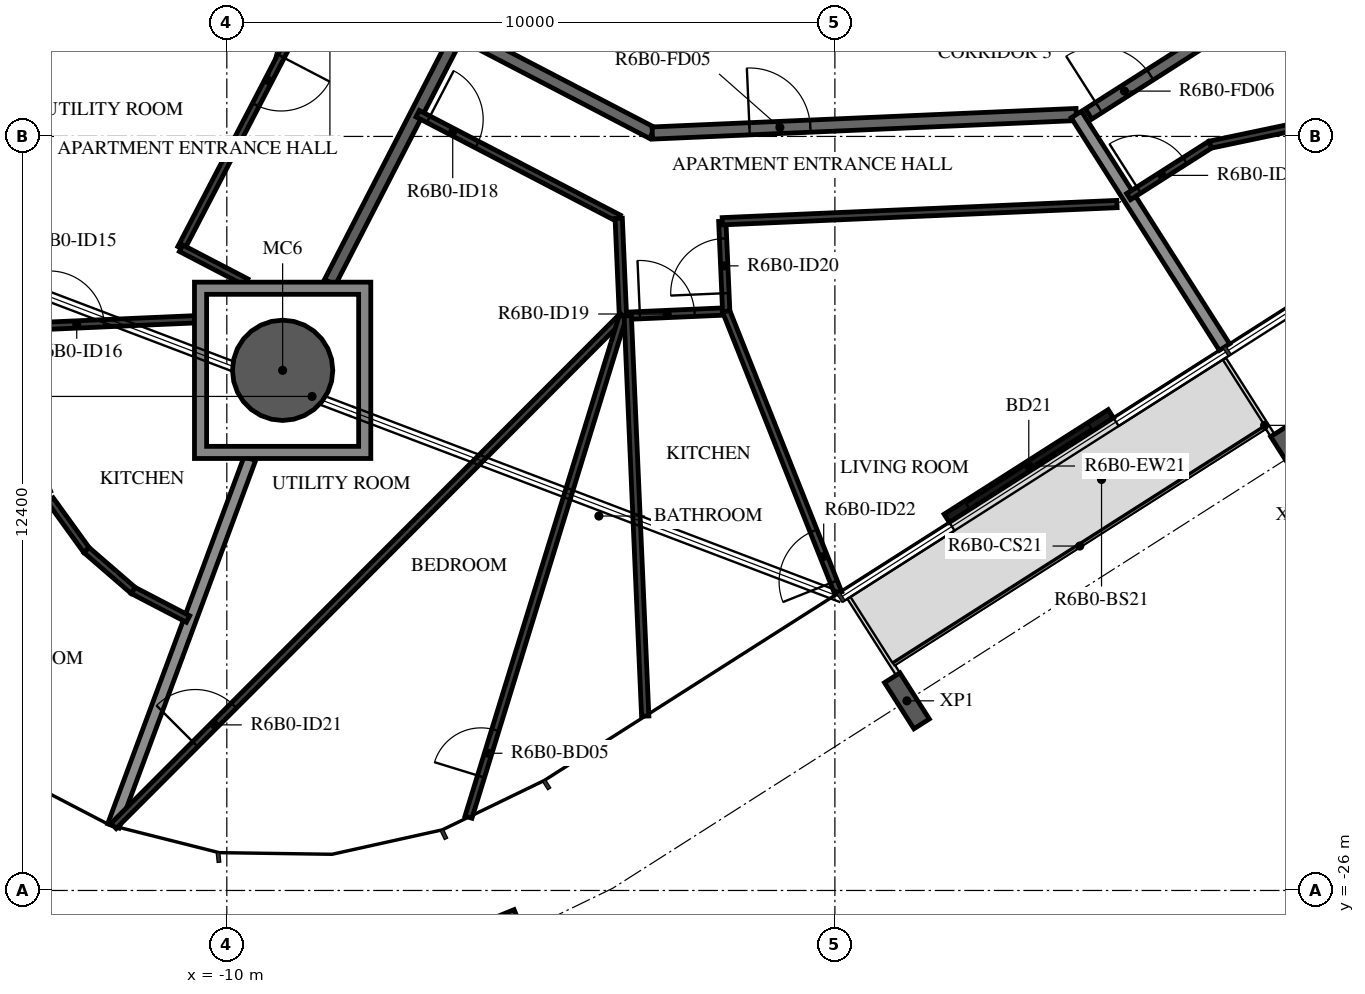
"""IFC4 building model, lengths in metres.
Left out: names, types, materials, properties, quantities, classifications, styles, units other than length and angle.
Written with IfcOpenShell. Run it as: python <this file> out.ifc"""

import sys

from ifc_helpers import new_model, si_unit, direction, frame, frame_2d, origin, origin_2d, place, context, subcontext, project, spatial, polyline, rectangle, hollow_circle, i_section, outline, extrude, element, fill, save


model = new_model("IFC4")
c1 = context("Model", 3, precision=1e-05, world=origin(), true_north=direction((0.0, 1.0)))
c2 = subcontext(c1, "Body", "Model", "MODEL_VIEW")
j1 = project(units=[si_unit("LENGTHUNIT", "METRE"), si_unit("PLANEANGLEUNIT", "RADIAN")], contexts=[c1])
p1 = place(None, origin())
s1 = spatial("IfcSite", under=j1, at=p1, CompositionType="ELEMENT")
p2 = place(p1, origin())
s2 = spatial("IfcBuilding", under=s1, at=p2, CompositionType="ELEMENT")
p3 = place(p2, frame((0.0, 0.0, 240.7)))
s3 = spatial("IfcBuildingStorey", under=s2, at=p3, CompositionType="ELEMENT", Elevation=240.7)
p4 = place(p3, frame((-9.082, -17.446, -0.38), z_axis=(0.0, 0.0, 1.0), x_axis=(1.0, 0.0, 0.0)))
e1 = element("IfcColumn", 1, at=p4, inside=s3, PredefinedType="COLUMN", context=c2, shape_type="SweptSolid", body=[
    extrude(hollow_circle(Radius=0.825, WallThickness=0.04, at=origin_2d()), origin(), (0.0, 0.0, 1.0), 3.5),
])
for number, where, z_axis, x_axis in (
    (2, (-5.243, -26.789, -0.38), (0.0, 0.0, 1.0), (-0.925, -0.38, 0.0)),
    (3, (1.185, -22.881, -0.38), (0.0, 0.0, 1.0), (-0.843, -0.537, 0.0)),
    (4, (7.535, -18.835, -0.38), (0.0, 0.0, 1.0), (-0.843, -0.537, 0.0)),
):
    element("IfcColumn", number, at=place(p3, frame(where, z_axis=z_axis, x_axis=x_axis)), inside=s3, PredefinedType="COLUMN", context=c2, shape_type="SweptSolid", body=[
        extrude(i_section(OverallWidth=0.3, OverallDepth=0.9, WebThickness=0.019, FlangeThickness=0.035, FilletRadius=0.03, at=origin_2d()), origin(), (0.0, 0.0, 1.0), 3.5),
    ])
p5 = place(p3, frame((1.839, -19.879, 0.0), z_axis=(0.0, 0.0, 1.0), x_axis=(0.843419508298, 0.53725555653, 0.0)))
e5 = element("IfcWall", 5, at=p5, inside=s3, PredefinedType="STANDARD", context=c2, shape_type="SweptSolid", body=[
    extrude(rectangle(XDim=3.2, YDim=0.16, at=frame_2d((1.6, 0.0))), origin(), (0.0, 0.0, 1.0), 3.12),
])
p6 = place(p5, frame((0.4, 0.0, 0.0)))
e6 = element("IfcOpeningElement", 6, at=p6, cuts=e5, PredefinedType="OPENING", context=c2, shape_type="SweptSolid", body=[
    extrude(rectangle(XDim=2.4, YDim=2.4, at=frame_2d((1.2, 1.2))), frame((0.0, 0.09, 0.0), z_axis=(0.0, -1.0, 0.0), x_axis=(1.0, 0.0, 0.0)), (0.0, 0.0, 1.0), 0.18),
])
p7 = place(p3, frame((-9.372, -10.228, 0.0), z_axis=(0.0, 0.0, 1.0), x_axis=(0.887005184532, -0.461759464021, 0.0)))
e7 = element("IfcWall", 7, at=p7, inside=s3, PredefinedType="STANDARD", context=c2, shape_type="SweptSolid", body=[
    extrude(rectangle(XDim=7.181, YDim=0.2, at=frame_2d((3.591, 0.0))), origin(), (0.0, 0.0, 1.0), 3.12),
])
p8 = place(p7, frame((2.391, 0.0, 0.0)))
e8 = element("IfcOpeningElement", 8, at=p8, cuts=e7, PredefinedType="OPENING", context=c2, shape_type="SweptSolid", body=[
    extrude(rectangle(XDim=1.0, YDim=2.1, at=frame_2d((0.5, 1.05))), frame((0.0, 0.11, 0.0), z_axis=(0.0, -1.0, 0.0), x_axis=(1.0, 0.0, 0.0)), (0.0, 0.0, 1.0), 0.22),
])
p9 = place(p3, frame((-3.003, -13.544, 0.0), z_axis=(0.0, 0.0, 1.0), x_axis=(0.999048221872, 0.043619380718, 0.0)))
e9 = element("IfcWall", 9, at=p9, inside=s3, PredefinedType="STANDARD", context=c2, shape_type="SweptSolid", body=[
    extrude(rectangle(XDim=6.979, YDim=0.2, at=frame_2d((3.49, 0.0))), origin(), (0.0, 0.0, 1.0), 3.12),
])
p10 = place(p9, frame((1.6, 0.0, 0.0)))
e10 = element("IfcOpeningElement", 10, at=p10, cuts=e9, PredefinedType="OPENING", context=c2, shape_type="SweptSolid", body=[
    extrude(rectangle(XDim=1.0, YDim=2.1, at=frame_2d((0.5, 1.05))), frame((0.0, 0.11, 0.0), z_axis=(0.0, -1.0, 0.0), x_axis=(1.0, 0.0, 0.0)), (0.0, 0.0, 1.0), 0.22),
])
p11 = place(p3, frame((4.172, -13.231, 0.0), z_axis=(0.0, 0.0, 1.0), x_axis=(0.843388394728, 0.537304397561, 0.0)))
e11 = element("IfcWall", 11, at=p11, inside=s3, PredefinedType="STANDARD", context=c2, shape_type="SweptSolid", body=[
    extrude(rectangle(XDim=7.181, YDim=0.2, at=frame_2d((3.59, 0.0))), origin(), (0.0, 0.0, 1.0), 3.12),
])
p12 = place(p11, frame((0.2, 0.0, 0.0)))
e12 = element("IfcOpeningElement", 12, at=p12, cuts=e11, PredefinedType="OPENING", context=c2, shape_type="SweptSolid", body=[
    extrude(rectangle(XDim=1.0, YDim=2.1, at=frame_2d((0.5, 1.05))), frame((0.0, 0.11, 0.0), z_axis=(0.0, -1.0, 0.0), x_axis=(1.0, 0.0, 0.0)), (0.0, 0.0, 1.0), 0.22),
])
p13 = place(p3, frame((-8.303, -15.996, 0.0), z_axis=(0.0, 0.0, 1.0), x_axis=(0.457702371186, 0.889105471477, 0.0)))
e13 = element("IfcWall", 13, at=p13, inside=s3, PredefinedType="STANDARD", context=c2, shape_type="SweptSolid", body=[
    extrude(rectangle(XDim=4.623, YDim=0.2, at=frame_2d((2.312, 0.0))), origin(), (0.0, 0.0, 1.0), 3.12),
])
p14 = place(p3, frame((-11.865, -24.939, 0.0), z_axis=(0.0, 0.0, 1.0), x_axis=(0.348245485283, 0.937403372076, 0.0)))
e14 = element("IfcWall", 14, at=p14, inside=s3, PredefinedType="STANDARD", context=c2, shape_type="SweptSolid", body=[
    extrude(rectangle(XDim=6.446, YDim=0.2, at=frame_2d((3.223, 0.0))), origin(), (0.0, 0.0, 1.0), 2.73),
])
p15 = place(p3, frame((6.407, -17.064, 0.0), z_axis=(0.0, 0.0, 1.0), x_axis=(-0.537324777979, 0.843375410461, 0.0)))
e15 = element("IfcWall", 15, at=p15, inside=s3, PredefinedType="STANDARD", context=c2, shape_type="SweptSolid", body=[
    extrude(rectangle(XDim=4.535, YDim=0.2, at=frame_2d((2.268, 0.0))), origin(), (0.0, 0.0, 1.0), 2.73),
])
p16 = place(p3, frame((-9.016, -12.104, 0.0), z_axis=(0.0, 0.0, 1.0), x_axis=(-0.4617534789, -0.887008300256, 0.0)))
e16 = element("IfcWall", 16, at=p16, inside=s3, PredefinedType="PARTITIONING", context=c2, shape_type="SweptSolid", body=[
    extrude(rectangle(XDim=3.759, YDim=0.12, at=frame_2d((1.88, 0.0))), origin(), (0.0, 0.0, 1.0), 3.12),
])
p17 = place(p16, frame((0.2, 0.0, 0.0)))
e17 = element("IfcOpeningElement", 17, at=p17, cuts=e16, PredefinedType="OPENING", context=c2, shape_type="SweptSolid", body=[
    extrude(rectangle(XDim=0.9, YDim=2.1, at=frame_2d((0.45, 1.05))), frame((0.0, 0.07, 0.0), z_axis=(0.0, -1.0, 0.0), x_axis=(1.0, 0.0, 0.0)), (0.0, 0.0, 1.0), 0.14),
])
p18 = place(p3, frame((-10.752, -15.439, 0.0), z_axis=(0.0, 0.0, 1.0), x_axis=(0.887031383626, -0.461709134048, 0.0)))
e18 = element("IfcWall", 18, at=p18, inside=s3, PredefinedType="PARTITIONING", context=c2, shape_type="SweptSolid", body=[
    extrude(rectangle(XDim=1.208, YDim=0.12, at=frame_2d((0.604, 0.0))), origin(), (0.0, 0.0, 1.0), 3.12),
])
p19 = place(p3, frame((-13.517, -16.738, 0.0), z_axis=(0.0, 0.0, 1.0), x_axis=(0.999047660155, 0.043632244256, 0.0)))
e19 = element("IfcWall", 19, at=p19, inside=s3, PredefinedType="PARTITIONING", context=c2, shape_type="SweptSolid", body=[
    extrude(rectangle(XDim=2.988, YDim=0.12, at=frame_2d((1.494, 0.0))), origin(), (0.0, 0.0, 1.0), 3.12),
])
p20 = place(p19, frame((0.6, 0.0, 0.0)))
e20 = element("IfcOpeningElement", 20, at=p20, cuts=e19, PredefinedType="OPENING", context=c2, shape_type="SweptSolid", body=[
    extrude(rectangle(XDim=0.9, YDim=2.1, at=frame_2d((0.45, 1.05))), frame((0.0, 0.07, 0.0), z_axis=(0.0, -1.0, 0.0), x_axis=(1.0, 0.0, 0.0)), (0.0, 0.0, 1.0), 0.14),
])
for number, where, z_axis, x_axis in (
    (21, (-12.903, -19.579, 0.0), (0.0, 0.0, 1.0), (0.585, -0.811, 0.0)),
    (22, (-12.308, -20.402, 0.0), (0.0, 0.0, 1.0), (0.757, -0.654, 0.0)),
    (23, (-11.539, -21.067, 0.0), (0.0, 0.0, 1.0), (0.887, -0.462, 0.0)),
):
    element("IfcWall", number, at=place(p3, frame(where, z_axis=z_axis, x_axis=x_axis)), inside=s3, PredefinedType="PARTITIONING", context=c2, shape_type="SweptSolid", body=[
        extrude(rectangle(XDim=1.016, YDim=0.12, at=frame_2d((0.508, 0.0))), origin(), (0.0, 0.0, 1.0), 3.12),
    ])
p21 = place(p3, frame((-6.861, -13.226, 0.0), z_axis=(0.0, 0.0, 1.0), x_axis=(0.887010791097, -0.461748694073, 0.0)))
e24 = element("IfcWall", 24, at=p21, inside=s3, PredefinedType="PARTITIONING", context=c2, shape_type="SweptSolid", body=[
    extrude(rectangle(XDim=3.727, YDim=0.12, at=frame_2d((1.864, 0.0))), origin(), (0.0, 0.0, 1.0), 3.12),
])
p22 = place(p21, frame((0.2, 0.0, 0.0)))
e25 = element("IfcOpeningElement", 25, at=p22, cuts=e24, PredefinedType="OPENING", context=c2, shape_type="SweptSolid", body=[
    extrude(rectangle(XDim=0.9, YDim=2.1, at=frame_2d((0.45, 1.05))), frame((0.0, 0.07, 0.0), z_axis=(0.0, -1.0, 0.0), x_axis=(1.0, 0.0, 0.0)), (0.0, 0.0, 1.0), 0.14),
])
p23 = place(p3, frame((-3.555, -14.947, 0.0), z_axis=(0.0, 0.0, 1.0), x_axis=(0.043470204022, -0.999054723908, 0.0)))
e26 = element("IfcWall", 26, at=p23, inside=s3, PredefinedType="PARTITIONING", context=c2, shape_type="SweptSolid", body=[
    extrude(rectangle(XDim=1.606, YDim=0.12, at=frame_2d((0.803, 0.0))), origin(), (0.0, 0.0, 1.0), 3.12),
])
p24 = place(p3, frame((-3.407, -16.548, 0.0), z_axis=(0.0, 0.0, 1.0), x_axis=(0.999045901572, 0.043672491929, 0.0)))
e27 = element("IfcWall", 27, at=p24, inside=s3, PredefinedType="PARTITIONING", context=c2, shape_type="SweptSolid", body=[
    extrude(rectangle(XDim=1.621, YDim=0.12, at=frame_2d((0.811, 0.0))), origin(), (0.0, 0.0, 1.0), 3.12),
])
p25 = place(p24, frame((0.2, 0.0, 0.0)))
e28 = element("IfcOpeningElement", 28, at=p25, cuts=e27, PredefinedType="OPENING", context=c2, shape_type="SweptSolid", body=[
    extrude(rectangle(XDim=0.9, YDim=2.1, at=frame_2d((0.45, 1.05))), frame((0.0, 0.07, 0.0), z_axis=(0.0, -1.0, 0.0), x_axis=(1.0, 0.0, 0.0)), (0.0, 0.0, 1.0), 0.14),
])
p26 = place(p3, frame((-1.787, -16.478, 0.0), z_axis=(0.0, 0.0, 1.0), x_axis=(-0.043601447011, 0.999049004713, 0.0)))
e29 = element("IfcWall", 29, at=p26, inside=s3, PredefinedType="PARTITIONING", context=c2, shape_type="SweptSolid", body=[
    extrude(rectangle(XDim=1.484, YDim=0.12, at=frame_2d((0.742, 0.0))), origin(), (0.0, 0.0, 1.0), 3.12),
])
p27 = place(p26, frame((0.3, 0.0, 0.0)))
e30 = element("IfcOpeningElement", 30, at=p27, cuts=e29, PredefinedType="OPENING", context=c2, shape_type="SweptSolid", body=[
    extrude(rectangle(XDim=0.9, YDim=2.1, at=frame_2d((0.45, 1.05))), frame((0.0, 0.07, 0.0), z_axis=(0.0, -1.0, 0.0), x_axis=(1.0, 0.0, 0.0)), (0.0, 0.0, 1.0), 0.14),
])
p28 = place(p3, frame((-1.852, -14.995, 0.0), z_axis=(0.0, 0.0, 1.0), x_axis=(0.999047773092, 0.043629658249, 0.0)))
e31 = element("IfcWall", 31, at=p28, inside=s3, PredefinedType="PARTITIONING", context=c2, shape_type="SweptSolid", body=[
    extrude(rectangle(XDim=6.497, YDim=0.12, at=frame_2d((3.248, 0.0))), origin(), (0.0, 0.0, 1.0), 3.12),
])
p29 = place(p3, frame((-11.862, -24.94, 0.0), z_axis=(0.0, 0.0, 1.0), x_axis=(0.70663293894, 0.707580306117, 0.0)))
e32 = element("IfcWall", 32, at=p29, inside=s3, PredefinedType="PARTITIONING", context=c2, shape_type="SweptSolid", body=[
    extrude(rectangle(XDim=11.854, YDim=0.12, at=frame_2d((5.927, 0.0))), origin(), (0.0, 0.0, 1.0), 3.12),
])
p30 = place(p29, frame((1.9, 0.0, 0.0)))
e33 = element("IfcOpeningElement", 33, at=p30, cuts=e32, PredefinedType="OPENING", context=c2, shape_type="SweptSolid", body=[
    extrude(rectangle(XDim=0.9, YDim=2.1, at=frame_2d((0.45, 1.05))), frame((0.0, 0.07, 0.0), z_axis=(0.0, -1.0, 0.0), x_axis=(1.0, 0.0, 0.0)), (0.0, 0.0, 1.0), 0.14),
])
p31 = place(p3, frame((-6.026, -24.795, 0.0), z_axis=(0.0, 0.0, 1.0), x_axis=(0.294501505058, 0.955651015548, 0.0)))
e34 = element("IfcWall", 34, at=p31, inside=s3, PredefinedType="PARTITIONING", context=c2, shape_type="SweptSolid", body=[
    extrude(rectangle(XDim=8.626, YDim=0.12, at=frame_2d((4.313, 0.0))), origin(), (0.0, 0.0, 1.0), 3.12),
])
p32 = place(p31, frame((0.7, 0.0, 0.0)))
e35 = element("IfcOpeningElement", 35, at=p32, cuts=e34, PredefinedType="OPENING", context=c2, shape_type="SweptSolid", body=[
    extrude(rectangle(XDim=0.8, YDim=2.1, at=frame_2d((0.4, 1.05))), frame((0.0, 0.07, 0.0), z_axis=(0.0, -1.0, 0.0), x_axis=(1.0, 0.0, 0.0)), (0.0, 0.0, 1.0), 0.14),
])
p33 = place(p3, frame((-3.119, -23.133, 0.0), z_axis=(0.0, 0.0, 1.0), x_axis=(-0.043633326708, 0.99904761288, 0.0)))
e36 = element("IfcWall", 36, at=p33, inside=s3, PredefinedType="PARTITIONING", context=c2, shape_type="SweptSolid", body=[
    extrude(rectangle(XDim=6.591, YDim=0.12, at=frame_2d((3.296, 0.0))), origin(), (0.0, 0.0, 1.0), 3.12),
])
p34 = place(p3, frame((0.056, -21.11, 0.0), z_axis=(0.0, 0.0, 1.0), x_axis=(-0.369701541807, 0.929150563679, 0.0)))
e37 = element("IfcWall", 37, at=p34, inside=s3, PredefinedType="PARTITIONING", context=c2, shape_type="SweptSolid", body=[
    extrude(rectangle(XDim=4.986, YDim=0.12, at=frame_2d((2.493, 0.0))), origin(), (0.0, 0.0, 1.0), 2.73),
])
p35 = place(p34, frame((0.2, 0.0, 0.0)))
e38 = element("IfcOpeningElement", 38, at=p35, cuts=e37, PredefinedType="OPENING", context=c2, shape_type="SweptSolid", body=[
    extrude(rectangle(XDim=0.9, YDim=2.1, at=frame_2d((0.45, 1.05))), frame((0.0, 0.07, 0.0), z_axis=(0.0, -1.0, 0.0), x_axis=(1.0, 0.0, 0.0)), (0.0, 0.0, 1.0), 0.14),
])
p36 = place(p3, frame((4.83, -14.59, 0.0), z_axis=(0.0, 0.0, 1.0), x_axis=(0.843395898817, 0.537292618467, 0.0)))
e39 = element("IfcWall", 39, at=p36, inside=s3, PredefinedType="PARTITIONING", context=c2, shape_type="SweptSolid", body=[
    extrude(rectangle(XDim=1.59, YDim=0.12, at=frame_2d((0.795, 0.0))), origin(), (0.0, 0.0, 1.0), 3.12),
])
p37 = place(p36, frame((0.2, 0.0, 0.0)))
e40 = element("IfcOpeningElement", 40, at=p37, cuts=e39, PredefinedType="OPENING", context=c2, shape_type="SweptSolid", body=[
    extrude(rectangle(XDim=0.9, YDim=2.1, at=frame_2d((0.45, 1.05))), frame((0.0, 0.07, 0.0), z_axis=(0.0, -1.0, 0.0), x_axis=(1.0, 0.0, 0.0)), (0.0, 0.0, 1.0), 0.14),
])
p38 = place(p3, frame((6.172, -13.735, 0.0), z_axis=(0.0, 0.0, 1.0), x_axis=(0.978659442958, 0.205488916271, 0.0)))
e41 = element("IfcWall", 41, at=p38, inside=s3, PredefinedType="PARTITIONING", context=c2, shape_type="SweptSolid", body=[
    extrude(rectangle(XDim=1.817, YDim=0.12, at=frame_2d((0.908, 0.0))), origin(), (0.0, 0.0, 1.0), 3.12),
])
p39 = place(p3, origin())
e42 = element("IfcWall", 42, at=p39, inside=s3, PredefinedType="STANDARD", context=c2, shape_type="SweptSolid", body=[
    extrude(outline(polyline([(-7.632, -15.996), (-7.632, -18.896), (-10.532, -18.896), (-10.532, -15.996), (-7.632, -15.996)]), holes=[polyline([(-10.332, -18.696), (-7.832, -18.696), (-7.832, -16.196), (-10.332, -16.196), (-10.332, -18.696)])]), origin(), (0.0, 0.0, 1.0), 3.12),
])
p40 = place(p6, origin())
e43 = element("IfcDoor", 43, at=p40, inside=s3, OperationType="DOUBLE_DOOR_SLIDING", PredefinedType="DOOR", context=c2, shape_type="SweptSolid", body=[
    extrude(rectangle(XDim=2.4, YDim=2.4, at=frame_2d((1.2, 1.2))), frame((0.0, 0.025, 0.0), z_axis=(0.0, -1.0, 0.0), x_axis=(1.0, 0.0, 0.0)), (0.0, 0.0, 1.0), 0.05),
])
fill(e6, e43)
p41 = place(p17, origin())
e44 = element("IfcDoor", 44, at=p41, inside=s3, OperationType="SINGLE_SWING_RIGHT", PredefinedType="DOOR", context=c2, shape_type="SweptSolid", body=[
    extrude(rectangle(XDim=0.9, YDim=2.1, at=frame_2d((0.45, 1.05))), frame((0.0, 0.025, 0.0), z_axis=(0.0, -1.0, 0.0), x_axis=(1.0, 0.0, 0.0)), (0.0, 0.0, 1.0), 0.05),
])
fill(e17, e44)
p42 = place(p20, origin())
e45 = element("IfcDoor", 45, at=p42, inside=s3, OperationType="SINGLE_SWING_RIGHT", PredefinedType="DOOR", context=c2, shape_type="SweptSolid", body=[
    extrude(rectangle(XDim=0.9, YDim=2.1, at=frame_2d((0.45, 1.05))), frame((0.0, 0.025, 0.0), z_axis=(0.0, -1.0, 0.0), x_axis=(1.0, 0.0, 0.0)), (0.0, 0.0, 1.0), 0.05),
])
fill(e20, e45)
p43 = place(p10, origin())
e46 = element("IfcDoor", 46, at=p43, inside=s3, OperationType="SINGLE_SWING_LEFT", PredefinedType="DOOR", context=c2, shape_type="SweptSolid", body=[
    extrude(rectangle(XDim=1.0, YDim=2.1, at=frame_2d((0.5, 1.05))), frame((0.0, 0.025, 0.0), z_axis=(0.0, -1.0, 0.0), x_axis=(1.0, 0.0, 0.0)), (0.0, 0.0, 1.0), 0.05),
])
fill(e10, e46)
p44 = place(p22, origin())
e47 = element("IfcDoor", 47, at=p44, inside=s3, OperationType="SINGLE_SWING_LEFT", PredefinedType="DOOR", context=c2, shape_type="SweptSolid", body=[
    extrude(rectangle(XDim=0.9, YDim=2.1, at=frame_2d((0.45, 1.05))), frame((0.0, 0.025, 0.0), z_axis=(0.0, -1.0, 0.0), x_axis=(1.0, 0.0, 0.0)), (0.0, 0.0, 1.0), 0.05),
])
fill(e25, e47)
p45 = place(p25, origin())
e48 = element("IfcDoor", 48, at=p45, inside=s3, OperationType="SINGLE_SWING_LEFT", PredefinedType="DOOR", context=c2, shape_type="SweptSolid", body=[
    extrude(rectangle(XDim=0.9, YDim=2.1, at=frame_2d((0.45, 1.05))), frame((0.0, 0.025, 0.0), z_axis=(0.0, -1.0, 0.0), x_axis=(1.0, 0.0, 0.0)), (0.0, 0.0, 1.0), 0.05),
])
fill(e28, e48)
p46 = place(p27, origin())
e49 = element("IfcDoor", 49, at=p46, inside=s3, OperationType="SINGLE_SWING_LEFT", PredefinedType="DOOR", context=c2, shape_type="SweptSolid", body=[
    extrude(rectangle(XDim=0.9, YDim=2.1, at=frame_2d((0.45, 1.05))), frame((0.0, 0.025, 0.0), z_axis=(0.0, -1.0, 0.0), x_axis=(1.0, 0.0, 0.0)), (0.0, 0.0, 1.0), 0.05),
])
fill(e30, e49)
p47 = place(p30, origin())
e50 = element("IfcDoor", 50, at=p47, inside=s3, OperationType="SINGLE_SWING_RIGHT", PredefinedType="DOOR", context=c2, shape_type="SweptSolid", body=[
    extrude(rectangle(XDim=0.9, YDim=2.1, at=frame_2d((0.45, 1.05))), frame((0.0, 0.025, 0.0), z_axis=(0.0, -1.0, 0.0), x_axis=(1.0, 0.0, 0.0)), (0.0, 0.0, 1.0), 0.05),
])
fill(e33, e50)
p48 = place(p32, origin())
e51 = element("IfcDoor", 51, at=p48, inside=s3, OperationType="SINGLE_SWING_RIGHT", PredefinedType="DOOR", context=c2, shape_type="SweptSolid", body=[
    extrude(rectangle(XDim=0.8, YDim=2.1, at=frame_2d((0.4, 1.05))), frame((0.0, 0.025, 0.0), z_axis=(0.0, -1.0, 0.0), x_axis=(1.0, 0.0, 0.0)), (0.0, 0.0, 1.0), 0.05),
])
fill(e35, e51)
p49 = place(p35, origin())
e52 = element("IfcDoor", 52, at=p49, inside=s3, OperationType="SINGLE_SWING_LEFT", PredefinedType="DOOR", context=c2, shape_type="SweptSolid", body=[
    extrude(rectangle(XDim=0.9, YDim=2.1, at=frame_2d((0.45, 1.05))), frame((0.0, 0.025, 0.0), z_axis=(0.0, -1.0, 0.0), x_axis=(1.0, 0.0, 0.0)), (0.0, 0.0, 1.0), 0.05),
])
fill(e38, e52)
p50 = place(p12, origin())
e53 = element("IfcDoor", 53, at=p50, inside=s3, OperationType="SINGLE_SWING_LEFT", PredefinedType="DOOR", context=c2, shape_type="SweptSolid", body=[
    extrude(rectangle(XDim=1.0, YDim=2.1, at=frame_2d((0.5, 1.05))), frame((0.0, 0.025, 0.0), z_axis=(0.0, -1.0, 0.0), x_axis=(1.0, 0.0, 0.0)), (0.0, 0.0, 1.0), 0.05),
])
fill(e12, e53)
p51 = place(p37, origin())
e54 = element("IfcDoor", 54, at=p51, inside=s3, OperationType="SINGLE_SWING_LEFT", PredefinedType="DOOR", context=c2, shape_type="SweptSolid", body=[
    extrude(rectangle(XDim=0.9, YDim=2.1, at=frame_2d((0.45, 1.05))), frame((0.0, 0.025, 0.0), z_axis=(0.0, -1.0, 0.0), x_axis=(1.0, 0.0, 0.0)), (0.0, 0.0, 1.0), 0.05),
])
fill(e40, e54)
save(model, sys.argv[1])
